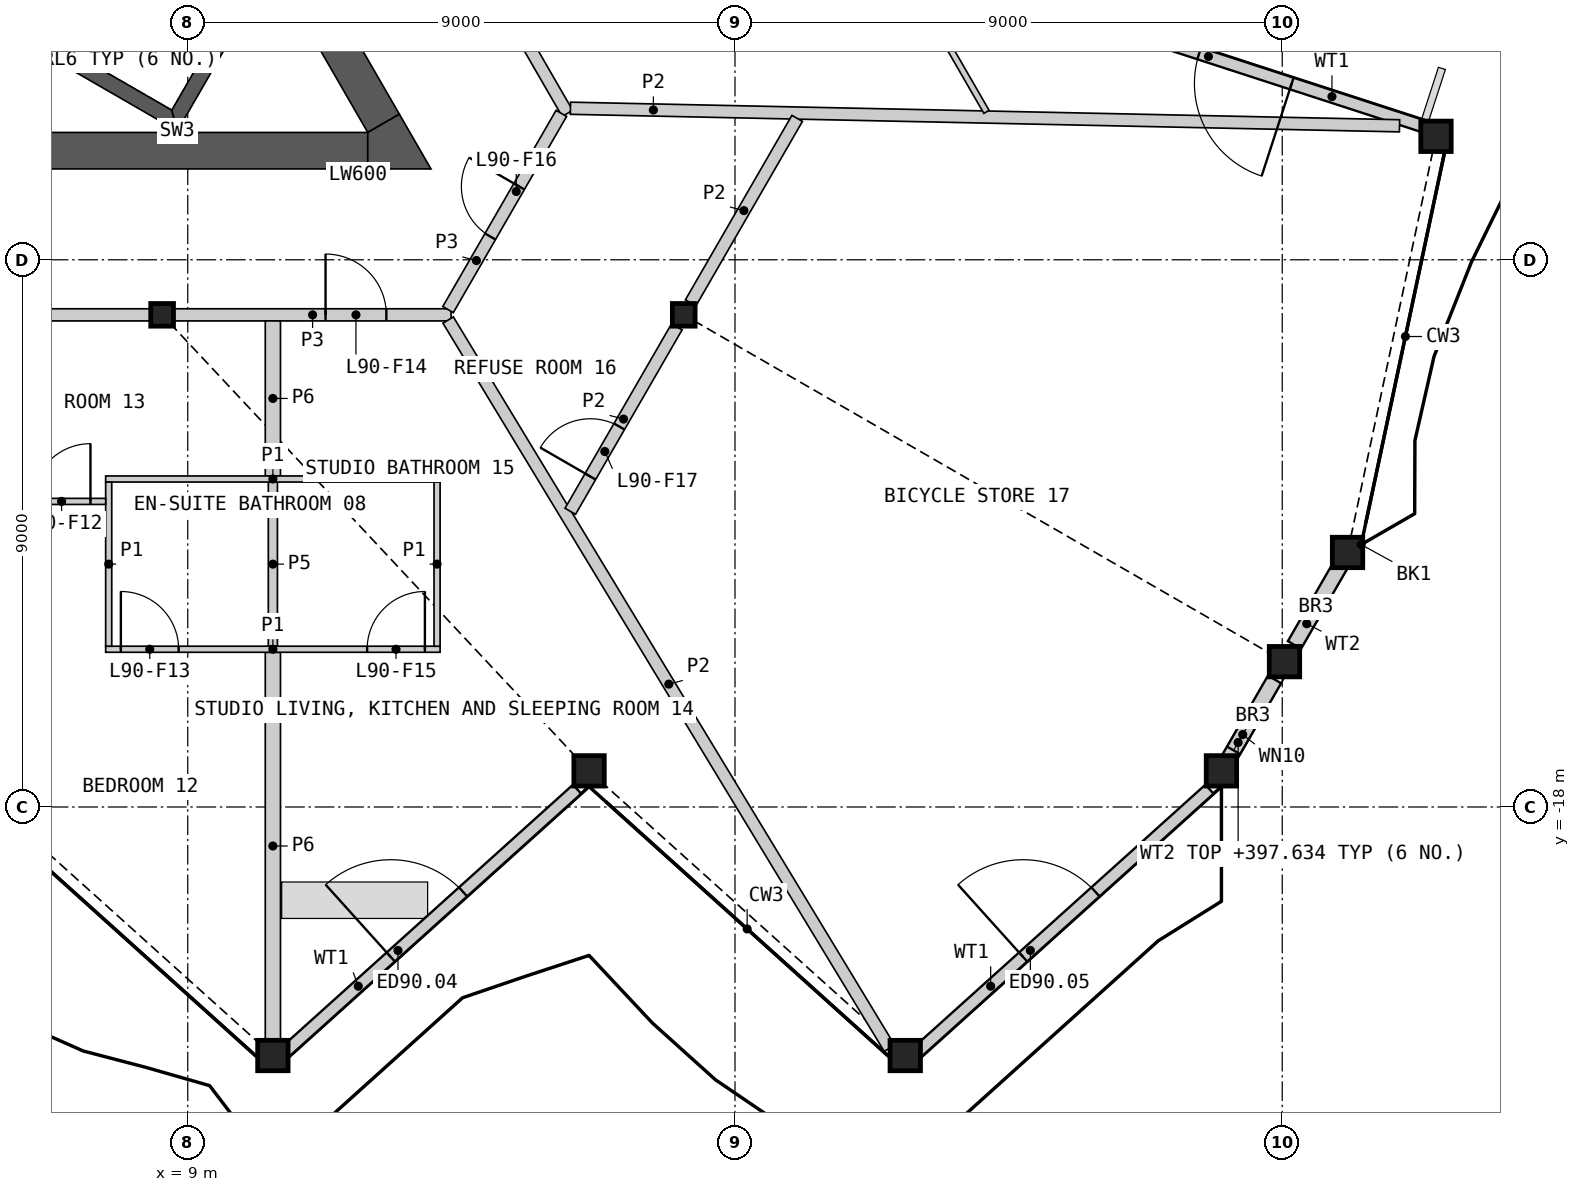
"""IFC4 building model, lengths in metres.
Left out: names, types, materials, properties, quantities, classifications, styles, units other than length and angle.
Written with IfcOpenShell. Run it as: python <this file> out.ifc"""

import sys

from ifc_helpers import new_model, si_unit, direction, frame, frame_2d, origin, origin_2d, place, context, subcontext, project, spatial, polyline, rectangle, hollow_rectangle, i_section, outline, extrude, element, fill, save


model = new_model("IFC4")
c1 = context("Model", 3, precision=1e-05, world=origin(), true_north=direction((0.0, 1.0)))
c2 = subcontext(c1, "Body", "Model", "MODEL_VIEW")
j1 = project(units=[si_unit("LENGTHUNIT", "METRE"), si_unit("PLANEANGLEUNIT", "RADIAN")], contexts=[c1])
p1 = place(None, origin())
s1 = spatial("IfcSite", under=j1, at=p1, CompositionType="ELEMENT")
p2 = place(p1, origin())
s2 = spatial("IfcBuilding", under=s1, at=p2, CompositionType="ELEMENT")
p3 = place(p2, frame((0.0, 0.0, 395.0)))
s3 = spatial("IfcBuildingStorey", under=s2, at=p3, CompositionType="ELEMENT", Elevation=395.0)
for number, where, z_axis, x_axis in (
    (1, (10.4, -22.088, 0.0), (0.0, 0.0, 1.0), (1.0, 0.0, 0.0)),
    (2, (15.6, -17.406, 0.0), (0.0, 0.0, 1.0), (1.0, 0.0, 0.0)),
    (3, (20.8, -22.088, 0.0), (0.0, 0.0, 1.0), (1.0, 0.0, 0.0)),
    (4, (26.0, -17.406, 0.0), (0.0, 0.0, 1.0), (1.0, 0.0, 0.0)),
    (5, (27.037, -15.61, 0.0), (0.0, 0.0, 1.0), (1.0, 0.0, 0.0)),
    (6, (28.074, -13.814, 0.0), (0.0, 0.0, 1.0), (1.0, 0.0, 0.0)),
    (7, (29.529, -6.969, 0.0), (0.0, 0.0, 1.0), (1.0, 0.0, 0.0)),
):
    element("IfcColumn", number, at=place(p3, frame(where, z_axis=z_axis, x_axis=x_axis)), inside=s3, PredefinedType="COLUMN", context=c2, shape_type="SweptSolid", body=[
        extrude(hollow_rectangle(XDim=0.5, YDim=0.5, WallThickness=0.03, at=origin_2d()), origin(), (0.0, 0.0, 1.0), 3.4),
    ])
for number, where, z_axis, x_axis in (
    (8, (8.578, -9.906, 0.0), (0.0, 0.0, 1.0), (1.0, 0.0, 0.0)),
    (9, (17.157, -9.906, 0.0), (0.0, 0.0, 1.0), (1.0, 0.0, 0.0)),
):
    element("IfcColumn", number, at=place(p3, frame(where, z_axis=z_axis, x_axis=x_axis)), inside=s3, PredefinedType="COLUMN", context=c2, shape_type="SweptSolid", body=[
        extrude(i_section(OverallWidth=0.374, OverallDepth=0.372, WebThickness=0.016, FlangeThickness=0.026, at=origin_2d()), origin(), (0.0, 0.0, 1.0), 3.4),
    ])
p4 = place(p3, frame((10.605, -22.028, 0.0), z_axis=(0.0, 0.0, 1.0), x_axis=(0.743153126052, 0.669121387522, 0.0)))
e10 = element("IfcWall", 10, at=p4, inside=s3, PredefinedType="SOLIDWALL", context=c2, shape_type="SweptSolid", body=[
    extrude(rectangle(XDim=6.457, YDim=0.2, at=frame_2d((3.229, 0.0))), origin(), (0.0, 0.0, 1.0), 2.634),
])
p5 = place(p4, frame((2.333, 0.0, 0.0)))
e11 = element("IfcOpeningElement", 11, at=p5, cuts=e10, PredefinedType="OPENING", context=c2, shape_type="SweptSolid", body=[
    extrude(rectangle(XDim=1.6, YDim=2.25, at=frame_2d((0.8, 1.125))), frame((0.0, 0.11, 0.0), z_axis=(0.0, -1.0, 0.0), x_axis=(1.0, 0.0, 0.0)), (0.0, 0.0, 1.0), 0.22),
])
p6 = place(p3, frame((21.005, -22.028, 0.0), z_axis=(0.0, 0.0, 1.0), x_axis=(0.743136196971, 0.669140189162, 0.0)))
e12 = element("IfcWall", 12, at=p6, inside=s3, PredefinedType="SOLIDWALL", context=c2, shape_type="SweptSolid", body=[
    extrude(rectangle(XDim=6.457, YDim=0.2, at=frame_2d((3.229, 0.0))), origin(), (0.0, 0.0, 1.0), 2.634),
])
p7 = place(p6, frame((2.333, 0.0, 0.0)))
e13 = element("IfcOpeningElement", 13, at=p7, cuts=e12, PredefinedType="OPENING", context=c2, shape_type="SweptSolid", body=[
    extrude(rectangle(XDim=1.6, YDim=2.25, at=frame_2d((0.8, 1.125))), frame((0.0, 0.11, 0.0), z_axis=(0.0, -1.0, 0.0), x_axis=(1.0, 0.0, 0.0)), (0.0, 0.0, 1.0), 0.22),
])
p8 = place(p3, frame((26.075, -17.285, 0.0), z_axis=(0.0, 0.0, 1.0), x_axis=(0.500017882314, 0.866015079179, 0.0)))
e14 = element("IfcWall", 14, at=p8, inside=s3, PredefinedType="SOLIDWALL", context=c2, shape_type="SweptSolid", body=[
    extrude(rectangle(XDim=1.598, YDim=0.25, at=frame_2d((0.799, 0.0))), origin(), (0.0, 0.0, 1.0), 2.634),
])
p9 = place(p8, frame((0.25, 0.0, 0.4)))
e15 = element("IfcOpeningElement", 15, at=p9, cuts=e14, PredefinedType="OPENING", context=c2, shape_type="SweptSolid", body=[
    extrude(rectangle(XDim=0.6, YDim=0.6, at=frame_2d((0.3, 0.3))), frame((0.0, 0.135, 0.0), z_axis=(0.0, -1.0, 0.0), x_axis=(1.0, 0.0, 0.0)), (0.0, 0.0, 1.0), 0.27),
])
p10 = place(p3, frame((27.201, -15.335, 0.0), z_axis=(0.0, 0.0, 1.0), x_axis=(0.499967189098, 0.866044346339, 0.0)))
e16 = element("IfcWall", 16, at=p10, inside=s3, PredefinedType="SOLIDWALL", context=c2, shape_type="SweptSolid", body=[
    extrude(rectangle(XDim=1.612, YDim=0.25, at=frame_2d((0.806, 0.0))), origin(), (0.0, 0.0, 1.0), 2.634),
])
p11 = place(p3, frame((29.374, -6.822, 0.0), z_axis=(0.0, 0.0, 1.0), x_axis=(-0.951061473407, 0.309001737536, 0.0)))
e17 = element("IfcWall", 17, at=p11, inside=s3, PredefinedType="SOLIDWALL", context=c2, shape_type="SweptSolid", body=[
    extrude(rectangle(XDim=6.546, YDim=0.2, at=frame_2d((3.273, 0.0))), origin(), (0.0, 0.0, 1.0), 2.634),
])
p12 = place(p11, frame((2.333, 0.0, 0.0)))
e18 = element("IfcOpeningElement", 18, at=p12, cuts=e17, PredefinedType="OPENING", context=c2, shape_type="SweptSolid", body=[
    extrude(rectangle(XDim=1.6, YDim=2.25, at=frame_2d((0.8, 1.125))), frame((0.0, 0.11, 0.0), z_axis=(0.0, -1.0, 0.0), x_axis=(1.0, 0.0, 0.0)), (0.0, 0.0, 1.0), 0.22),
])
p13 = place(p3, origin())
e19 = element("IfcWall", 19, at=p13, inside=s3, PredefinedType="SHEAR", context=c2, shape_type="SweptSolid", body=[
    extrude(outline(polyline([(3.763, -3.956), (8.83, -6.881), (8.738, -6.539), (3.888, -3.739), (3.763, -3.956)])), origin(), (0.0, 0.0, 1.0), 3.1),
])
p14 = place(p3, origin())
e20 = element("IfcWall", 20, at=p14, inside=s3, PredefinedType="SHEAR", context=c2, shape_type="SweptSolid", body=[
    extrude(outline(polyline([(8.83, -6.881), (10.374, -4.206), (10.032, -4.298), (8.738, -6.539), (8.83, -6.881)])), origin(), (0.0, 0.0, 1.0), 3.1),
])
p15 = place(p3, frame((-11.961, -7.206, 0.0), z_axis=(0.0, 0.0, 1.0), x_axis=(1.0, 0.0, 0.0)))
e21 = element("IfcWall", 21, at=p15, inside=s3, PredefinedType="SHEAR", context=c2, shape_type="SweptSolid", body=[
    extrude(rectangle(XDim=23.921, YDim=0.6, at=frame_2d((11.961, 0.0))), origin(), (0.0, 0.0, 1.0), 3.1),
])
p16 = place(p3, frame((12.221, -6.756, 0.0), z_axis=(0.0, 0.0, 1.0), x_axis=(-0.50000604952, 0.866021911064, 0.0)))
e22 = element("IfcWall", 22, at=p16, inside=s3, PredefinedType="SHEAR", context=c2, shape_type="SweptSolid", body=[
    extrude(rectangle(XDim=4.869, YDim=0.6, at=frame_2d((2.434, 0.0))), origin(), (0.0, 0.0, 1.0), 3.1),
])
p17 = place(p3, origin())
e23 = element("IfcWall", 23, at=p17, inside=s3, PredefinedType="SHEAR", context=c2, shape_type="SweptSolid", body=[
    extrude(outline(polyline([(11.961, -7.506), (11.961, -6.906), (12.48, -6.606), (13.0, -7.506), (11.961, -7.506)])), origin(), (0.0, 0.0, 1.0), 3.1),
])
p18 = place(p3, frame((0.197, -9.906, 0.0), z_axis=(0.0, 0.0, 1.0), x_axis=(1.0, 0.0, 0.0)))
e24 = element("IfcWall", 24, at=p18, inside=s3, PredefinedType="PARTITIONING", context=c2, shape_type="SweptSolid", body=[
    extrude(rectangle(XDim=8.185, YDim=0.2, at=frame_2d((4.092, 0.0))), origin(), (0.0, 0.0, 1.0), 3.1),
])
p19 = place(p18, frame((1.162, 0.0, 0.0)))
e25 = element("IfcOpeningElement", 25, at=p19, cuts=e24, PredefinedType="OPENING", context=c2, shape_type="SweptSolid", body=[
    extrude(rectangle(XDim=1.0, YDim=2.1, at=frame_2d((0.5, 1.05))), frame((0.0, 0.11, 0.0), z_axis=(0.0, -1.0, 0.0), x_axis=(1.0, 0.0, 0.0)), (0.0, 0.0, 1.0), 0.22),
])
p20 = place(p3, frame((10.4, -21.828, 0.0), z_axis=(0.0, 0.0, 1.0), x_axis=(0.0, 1.0, 0.0)))
e26 = element("IfcWall", 26, at=p20, inside=s3, PredefinedType="PARTITIONING", context=c2, shape_type="SweptSolid", body=[
    extrude(rectangle(XDim=6.372, YDim=0.25, at=frame_2d((3.186, 0.0))), origin(), (0.0, 0.0, 1.0), 2.33),
])
p21 = place(p3, frame((8.775, -9.906, 0.0), z_axis=(0.0, 0.0, 1.0), x_axis=(1.0, 0.0, 0.0)))
e27 = element("IfcWall", 27, at=p21, inside=s3, PredefinedType="PARTITIONING", context=c2, shape_type="SweptSolid", body=[
    extrude(rectangle(XDim=4.555, YDim=0.2, at=frame_2d((2.278, 0.0))), origin(), (0.0, 0.0, 1.0), 3.1),
])
p22 = place(p21, frame((2.491, 0.0, 0.0)))
e28 = element("IfcOpeningElement", 28, at=p22, cuts=e27, PredefinedType="OPENING", context=c2, shape_type="SweptSolid", body=[
    extrude(rectangle(XDim=1.0, YDim=2.1, at=frame_2d((0.5, 1.05))), frame((0.0, 0.11, 0.0), z_axis=(0.0, -1.0, 0.0), x_axis=(1.0, 0.0, 0.0)), (0.0, 0.0, 1.0), 0.22),
])
p23 = place(p3, frame((12.981, -2.673, 0.0), z_axis=(0.0, 0.0, 1.0), x_axis=(0.499974648164, -0.866040040179, 0.0)))
e29 = element("IfcWall", 29, at=p23, inside=s3, PredefinedType="PARTITIONING", context=c2, shape_type="SweptSolid", body=[
    extrude(rectangle(XDim=4.525, YDim=0.2, at=frame_2d((2.263, 0.0))), origin(), (0.0, 0.0, 1.0), 3.1),
])
p24 = place(p3, frame((13.281, -9.819, 0.0), z_axis=(0.0, 0.0, 1.0), x_axis=(0.499958791762, 0.866049194065, 0.0)))
e30 = element("IfcWall", 30, at=p24, inside=s3, PredefinedType="PARTITIONING", context=c2, shape_type="SweptSolid", body=[
    extrude(rectangle(XDim=3.726, YDim=0.2, at=frame_2d((1.863, 0.0))), origin(), (0.0, 0.0, 1.0), 3.1),
])
p25 = place(p24, frame((1.388, 0.0, 0.0)))
e31 = element("IfcOpeningElement", 31, at=p25, cuts=e30, PredefinedType="OPENING", context=c2, shape_type="SweptSolid", body=[
    extrude(rectangle(XDim=0.95, YDim=2.1, at=frame_2d((0.475, 1.05))), frame((0.0, 0.11, 0.0), z_axis=(0.0, -1.0, 0.0), x_axis=(1.0, 0.0, 0.0)), (0.0, 0.0, 1.0), 0.22),
])
p26 = place(p3, frame((10.4, -12.556, 0.0), z_axis=(0.0, 0.0, 1.0), x_axis=(0.0, 1.0, 0.0)))
e32 = element("IfcWall", 32, at=p26, inside=s3, PredefinedType="PARTITIONING", context=c2, shape_type="SweptSolid", body=[
    extrude(rectangle(XDim=2.55, YDim=0.25, at=frame_2d((1.275, 0.0))), origin(), (0.0, 0.0, 1.0), 2.33),
])
p27 = place(p3, frame((13.283, -9.991, 0.0), z_axis=(0.0, 0.0, 1.0), x_axis=(0.518239121386, -0.855235764608, 0.0)))
e33 = element("IfcWall", 33, at=p27, inside=s3, PredefinedType="PARTITIONING", context=c2, shape_type="SweptSolid", body=[
    extrude(rectangle(XDim=14.004, YDim=0.2, at=frame_2d((7.002, 0.0))), origin(), (0.0, 0.0, 1.0), 2.33),
])
p28 = place(p3, frame((15.294, -6.508, 0.0), z_axis=(0.0, 0.0, 1.0), x_axis=(0.999775726416, -0.02117774467, 0.0)))
e34 = element("IfcWall", 34, at=p28, inside=s3, PredefinedType="PARTITIONING", context=c2, shape_type="SweptSolid", body=[
    extrude(rectangle(XDim=13.638, YDim=0.2, at=frame_2d((6.819, 0.0))), origin(), (0.0, 0.0, 1.0), 2.33),
])
p29 = place(p3, frame((15.291, -13.137, 0.0), z_axis=(0.0, 0.0, 1.0), x_axis=(0.500005931509, 0.866021979199, 0.0)))
e35 = element("IfcWall", 35, at=p29, inside=s3, PredefinedType="PARTITIONING", context=c2, shape_type="SweptSolid", body=[
    extrude(rectangle(XDim=3.504, YDim=0.2, at=frame_2d((1.752, 0.0))), origin(), (0.0, 0.0, 1.0), 2.33),
])
p30 = place(p29, frame((0.661, 0.0, 0.0)))
e36 = element("IfcOpeningElement", 36, at=p30, cuts=e35, PredefinedType="OPENING", context=c2, shape_type="SweptSolid", body=[
    extrude(rectangle(XDim=0.95, YDim=2.1, at=frame_2d((0.475, 1.05))), frame((0.0, 0.11, 0.0), z_axis=(0.0, -1.0, 0.0), x_axis=(1.0, 0.0, 0.0)), (0.0, 0.0, 1.0), 0.22),
])
p31 = place(p3, frame((17.271, -9.708, 0.0), z_axis=(0.0, 0.0, 1.0), x_axis=(0.499983843005, 0.866034731829, 0.0)))
e37 = element("IfcWall", 37, at=p31, inside=s3, PredefinedType="PARTITIONING", context=c2, shape_type="SweptSolid", body=[
    extrude(rectangle(XDim=3.503, YDim=0.2, at=frame_2d((1.752, 0.0))), origin(), (0.0, 0.0, 1.0), 2.33),
])
p32 = place(p3, frame((10.4, -15.356, 0.0), z_axis=(0.0, 0.0, 1.0), x_axis=(0.0, 1.0, 0.0)))
e38 = element("IfcWall", 38, at=p32, inside=s3, PredefinedType="PLUMBINGWALL", context=c2, shape_type="SweptSolid", body=[
    extrude(rectangle(XDim=2.7, YDim=0.15, at=frame_2d((1.35, 0.0))), origin(), (0.0, 0.0, 1.0), 2.33),
])
p33 = place(p3, frame((18.983, -1.107, 0.0), z_axis=(0.0, 0.0, 1.0), x_axis=(0.500016298831, -0.866015993445, 0.0)))
e39 = element("IfcWall", 39, at=p33, inside=s3, PredefinedType="PARTITIONING", context=c2, shape_type="SweptSolid", body=[
    extrude(rectangle(XDim=6.305, YDim=0.1, at=frame_2d((3.152, 0.0))), origin(), (0.0, 0.0, 1.0), 2.33),
])
p34 = place(p33, frame((2.475, 0.0, 0.0)))
e40 = element("IfcOpeningElement", 40, at=p34, cuts=e39, PredefinedType="OPENING", context=c2, shape_type="SweptSolid", body=[
    extrude(rectangle(XDim=0.95, YDim=2.1, at=frame_2d((0.475, 1.05))), frame((0.0, 0.06, 0.0), z_axis=(0.0, -1.0, 0.0), x_axis=(1.0, 0.0, 0.0)), (0.0, 0.0, 1.0), 0.12),
])
p35 = place(p3, frame((7.65, -12.606, 0.0), z_axis=(0.0, 0.0, 1.0), x_axis=(1.0, 0.0, 0.0)))
e41 = element("IfcWall", 41, at=p35, inside=s3, PredefinedType="PARTITIONING", context=c2, shape_type="SweptSolid", body=[
    extrude(rectangle(XDim=5.5, YDim=0.1, at=frame_2d((2.75, 0.0))), origin(), (0.0, 0.0, 1.0), 2.33),
])
p36 = place(p3, frame((7.65, -15.406, 0.0), z_axis=(0.0, 0.0, 1.0), x_axis=(1.0, 0.0, 0.0)))
e42 = element("IfcWall", 42, at=p36, inside=s3, PredefinedType="PARTITIONING", context=c2, shape_type="SweptSolid", body=[
    extrude(rectangle(XDim=5.5, YDim=0.1, at=frame_2d((2.75, 0.0))), origin(), (0.0, 0.0, 1.0), 2.33),
])
p37 = place(p36, frame((0.25, 0.0, 0.0)))
e43 = element("IfcOpeningElement", 43, at=p37, cuts=e42, PredefinedType="OPENING", context=c2, shape_type="SweptSolid", body=[
    extrude(rectangle(XDim=0.95, YDim=2.1, at=frame_2d((0.475, 1.05))), frame((0.0, 0.06, 0.0), z_axis=(0.0, -1.0, 0.0), x_axis=(1.0, 0.0, 0.0)), (0.0, 0.0, 1.0), 0.12),
])
p38 = place(p36, frame((4.3, 0.0, 0.0)))
e44 = element("IfcOpeningElement", 44, at=p38, cuts=e42, PredefinedType="OPENING", context=c2, shape_type="SweptSolid", body=[
    extrude(rectangle(XDim=0.95, YDim=2.1, at=frame_2d((0.475, 1.05))), frame((0.0, 0.06, 0.0), z_axis=(0.0, -1.0, 0.0), x_axis=(1.0, 0.0, 0.0)), (0.0, 0.0, 1.0), 0.12),
])
for number, where, z_axis, x_axis in (
    (45, (7.7, -15.356, 0.0), (0.0, 0.0, 1.0), (0.0, 1.0, 0.0)),
    (46, (13.1, -15.356, 0.0), (0.0, 0.0, 1.0), (0.0, 1.0, 0.0)),
):
    element("IfcWall", number, at=place(p3, frame(where, z_axis=z_axis, x_axis=x_axis)), inside=s3, PredefinedType="PARTITIONING", context=c2, shape_type="SweptSolid", body=[
        extrude(rectangle(XDim=2.7, YDim=0.1, at=frame_2d((1.35, 0.0))), origin(), (0.0, 0.0, 1.0), 2.33),
    ])
p39 = place(p3, frame((5.25, -12.974, 0.0), z_axis=(0.0, 0.0, 1.0), x_axis=(1.0, 0.0, 0.0)))
e47 = element("IfcWall", 47, at=p39, inside=s3, PredefinedType="PARTITIONING", context=c2, shape_type="SweptSolid", body=[
    extrude(rectangle(XDim=2.4, YDim=0.1, at=frame_2d((1.2, 0.0))), origin(), (0.0, 0.0, 1.0), 2.33),
])
p40 = place(p39, frame((1.2, 0.0, 0.0)))
e48 = element("IfcOpeningElement", 48, at=p40, cuts=e47, PredefinedType="OPENING", context=c2, shape_type="SweptSolid", body=[
    extrude(rectangle(XDim=0.95, YDim=2.1, at=frame_2d((0.475, 1.05))), frame((0.0, 0.06, 0.0), z_axis=(0.0, -1.0, 0.0), x_axis=(1.0, 0.0, 0.0)), (0.0, 0.0, 1.0), 0.12),
])
p41 = place(p5, origin())
e49 = element("IfcDoor", 49, at=p41, inside=s3, OperationType="DOUBLE_DOOR_SINGLE_SWING", PredefinedType="DOOR", context=c2, shape_type="SweptSolid", body=[
    extrude(rectangle(XDim=1.6, YDim=2.25, at=frame_2d((0.8, 1.125))), frame((0.0, 0.025, 0.0), z_axis=(0.0, -1.0, 0.0), x_axis=(1.0, 0.0, 0.0)), (0.0, 0.0, 1.0), 0.05),
])
fill(e11, e49)
p42 = place(p7, origin())
e50 = element("IfcDoor", 50, at=p42, inside=s3, OperationType="DOUBLE_DOOR_SINGLE_SWING", PredefinedType="DOOR", context=c2, shape_type="SweptSolid", body=[
    extrude(rectangle(XDim=1.6, YDim=2.25, at=frame_2d((0.8, 1.125))), frame((0.0, 0.025, 0.0), z_axis=(0.0, -1.0, 0.0), x_axis=(1.0, 0.0, 0.0)), (0.0, 0.0, 1.0), 0.05),
])
fill(e13, e50)
p43 = place(p9, origin())
e51 = element("IfcWindow", 51, at=p43, inside=s3, PartitioningType="SINGLE_PANEL", PredefinedType="WINDOW", context=c2, shape_type="SweptSolid", body=[
    extrude(rectangle(XDim=0.6, YDim=0.6, at=frame_2d((0.3, 0.3))), frame((0.0, 0.03, 0.0), z_axis=(0.0, -1.0, 0.0), x_axis=(1.0, 0.0, 0.0)), (0.0, 0.0, 1.0), 0.06),
])
fill(e15, e51)
p44 = place(p12, origin())
e52 = element("IfcDoor", 52, at=p44, inside=s3, OperationType="DOUBLE_DOOR_SINGLE_SWING", PredefinedType="DOOR", context=c2, shape_type="SweptSolid", body=[
    extrude(rectangle(XDim=1.6, YDim=2.25, at=frame_2d((0.8, 1.125))), frame((0.0, 0.025, 0.0), z_axis=(0.0, -1.0, 0.0), x_axis=(1.0, 0.0, 0.0)), (0.0, 0.0, 1.0), 0.05),
])
fill(e18, e52)
p45 = place(p40, origin())
e53 = element("IfcDoor", 53, at=p45, inside=s3, OperationType="SINGLE_SWING_RIGHT", PredefinedType="DOOR", context=c2, shape_type="SweptSolid", body=[
    extrude(rectangle(XDim=0.95, YDim=2.1, at=frame_2d((0.475, 1.05))), frame((0.0, 0.025, 0.0), z_axis=(0.0, -1.0, 0.0), x_axis=(1.0, 0.0, 0.0)), (0.0, 0.0, 1.0), 0.05),
])
fill(e48, e53)
p46 = place(p37, origin())
e54 = element("IfcDoor", 54, at=p46, inside=s3, OperationType="SINGLE_SWING_LEFT", PredefinedType="DOOR", context=c2, shape_type="SweptSolid", body=[
    extrude(rectangle(XDim=0.95, YDim=2.1, at=frame_2d((0.475, 1.05))), frame((0.0, 0.025, 0.0), z_axis=(0.0, -1.0, 0.0), x_axis=(1.0, 0.0, 0.0)), (0.0, 0.0, 1.0), 0.05),
])
fill(e43, e54)
p47 = place(p22, origin())
e55 = element("IfcDoor", 55, at=p47, inside=s3, OperationType="SINGLE_SWING_LEFT", PredefinedType="DOOR", context=c2, shape_type="SweptSolid", body=[
    extrude(rectangle(XDim=1.0, YDim=2.1, at=frame_2d((0.5, 1.05))), frame((0.0, 0.025, 0.0), z_axis=(0.0, -1.0, 0.0), x_axis=(1.0, 0.0, 0.0)), (0.0, 0.0, 1.0), 0.05),
])
fill(e28, e55)
p48 = place(p38, origin())
e56 = element("IfcDoor", 56, at=p48, inside=s3, OperationType="SINGLE_SWING_RIGHT", PredefinedType="DOOR", context=c2, shape_type="SweptSolid", body=[
    extrude(rectangle(XDim=0.95, YDim=2.1, at=frame_2d((0.475, 1.05))), frame((0.0, 0.025, 0.0), z_axis=(0.0, -1.0, 0.0), x_axis=(1.0, 0.0, 0.0)), (0.0, 0.0, 1.0), 0.05),
])
fill(e44, e56)
p49 = place(p25, origin())
e57 = element("IfcDoor", 57, at=p49, inside=s3, OperationType="SINGLE_SWING_RIGHT", PredefinedType="DOOR", context=c2, shape_type="SweptSolid", body=[
    extrude(rectangle(XDim=0.95, YDim=2.1, at=frame_2d((0.475, 1.05))), frame((0.0, 0.025, 0.0), z_axis=(0.0, -1.0, 0.0), x_axis=(1.0, 0.0, 0.0)), (0.0, 0.0, 1.0), 0.05),
])
fill(e31, e57)
p50 = place(p30, origin())
e58 = element("IfcDoor", 58, at=p50, inside=s3, OperationType="SINGLE_SWING_LEFT", PredefinedType="DOOR", context=c2, shape_type="SweptSolid", body=[
    extrude(rectangle(XDim=0.95, YDim=2.1, at=frame_2d((0.475, 1.05))), frame((0.0, 0.025, 0.0), z_axis=(0.0, -1.0, 0.0), x_axis=(1.0, 0.0, 0.0)), (0.0, 0.0, 1.0), 0.05),
])
fill(e36, e58)
save(model, sys.argv[1])
